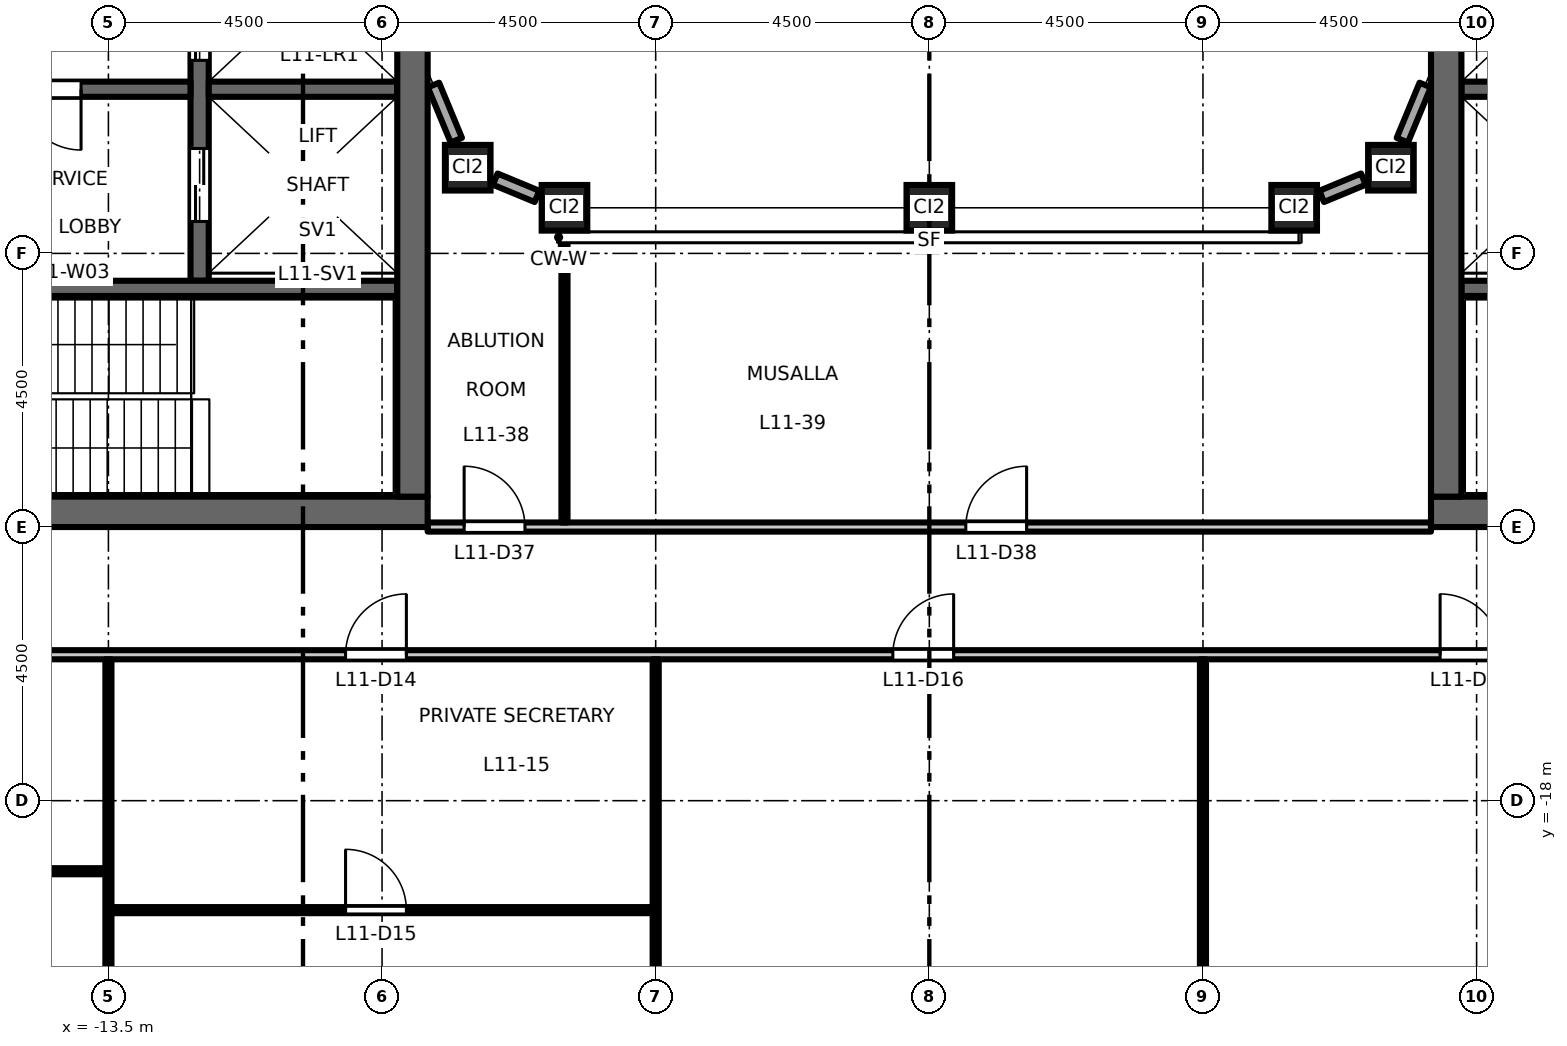
"""IFC4 building model, lengths in metres.
Left out: names, types, materials, properties, quantities, classifications, styles, units other than length and angle.
Written with IfcOpenShell. Run it as: python <this file> out.ifc"""

import sys

from ifc_helpers import new_model, si_unit, direction, frame, frame_2d, origin, origin_2d, place, context, subcontext, project, spatial, rectangle, hollow_rectangle, extrude, element, fill, save


model = new_model("IFC4")
c1 = context("Model", 3, precision=1e-05, world=origin(), true_north=direction((0.0, 1.0)))
c2 = subcontext(c1, "Body", "Model", "MODEL_VIEW")
j1 = project(units=[si_unit("LENGTHUNIT", "METRE"), si_unit("PLANEANGLEUNIT", "RADIAN")], contexts=[c1])
p1 = place(None, origin())
s1 = spatial("IfcSite", under=j1, at=p1, CompositionType="ELEMENT")
p2 = place(p1, origin())
s2 = spatial("IfcBuilding", under=s1, at=p2, CompositionType="ELEMENT")
p3 = place(p2, frame((0.0, 0.0, 53.7)))
s3 = spatial("IfcBuildingStorey", under=s2, at=p3, CompositionType="ELEMENT", Elevation=53.7)
for number, where, z_axis, x_axis in (
    (1, (-7.591, -7.591, 0.0), (0.0, 0.0, 1.0), (1.0, 0.0, 0.0)),
    (2, (-6.0, -8.25, 0.0), (0.0, 0.0, 1.0), (1.0, 0.0, 0.0)),
    (3, (0.0, -8.25, 0.0), (0.0, 0.0, 1.0), (1.0, 0.0, 0.0)),
    (4, (6.0, -8.25, 0.0), (0.0, 0.0, 1.0), (1.0, 0.0, 0.0)),
    (5, (7.591, -7.591, 0.0), (0.0, 0.0, 1.0), (1.0, 0.0, 0.0)),
):
    element("IfcColumn", number, at=place(p3, frame(where, z_axis=z_axis, x_axis=x_axis)), inside=s3, PredefinedType="COLUMN", context=c2, shape_type="SweptSolid", body=[
        extrude(hollow_rectangle(XDim=0.75, YDim=0.75, WallThickness=0.045, at=origin_2d()), origin(), (0.0, 0.0, 1.0), 4.5),
    ])
p4 = place(p3, frame((-12.0, -9.45, 0.0), z_axis=(0.0, 0.0, 1.0), x_axis=(0.0, 1.0, 0.0)))
e6 = element("IfcWall", 6, at=p4, inside=s3, PredefinedType="SHEAR", context=c2, shape_type="SweptSolid", body=[
    extrude(rectangle(XDim=18.9, YDim=0.3, at=frame_2d((9.45, 0.0))), origin(), (0.0, 0.0, 1.0), 4.35),
])
p5 = place(p4, frame((3.625, 0.0, 0.0)))
e7 = element("IfcOpeningElement", 7, at=p5, cuts=e6, PredefinedType="OPENING", context=c2, shape_type="SweptSolid", body=[
    extrude(rectangle(XDim=1.1, YDim=2.1, at=frame_2d((0.55, 1.05))), frame((0.0, 0.16, 0.0), z_axis=(0.0, -1.0, 0.0), x_axis=(1.0, 0.0, 0.0)), (0.0, 0.0, 1.0), 0.32),
])
p6 = place(p4, frame((6.775, 0.0, 0.0)))
e8 = element("IfcOpeningElement", 8, at=p6, cuts=e6, PredefinedType="OPENING", context=c2, shape_type="SweptSolid", body=[
    extrude(rectangle(XDim=1.1, YDim=2.1, at=frame_2d((0.55, 1.05))), frame((0.0, 0.16, 0.0), z_axis=(0.0, -1.0, 0.0), x_axis=(1.0, 0.0, 0.0)), (0.0, 0.0, 1.0), 0.32),
])
p7 = place(p4, frame((9.925, 0.0, 0.0)))
e9 = element("IfcOpeningElement", 9, at=p7, cuts=e6, PredefinedType="OPENING", context=c2, shape_type="SweptSolid", body=[
    extrude(rectangle(XDim=1.1, YDim=2.1, at=frame_2d((0.55, 1.05))), frame((0.0, 0.16, 0.0), z_axis=(0.0, -1.0, 0.0), x_axis=(1.0, 0.0, 0.0)), (0.0, 0.0, 1.0), 0.32),
])
p8 = place(p4, frame((13.075, 0.0, 0.0)))
e10 = element("IfcOpeningElement", 10, at=p8, cuts=e6, PredefinedType="OPENING", context=c2, shape_type="SweptSolid", body=[
    extrude(rectangle(XDim=1.1, YDim=2.1, at=frame_2d((0.55, 1.05))), frame((0.0, 0.16, 0.0), z_axis=(0.0, -1.0, 0.0), x_axis=(1.0, 0.0, 0.0)), (0.0, 0.0, 1.0), 0.32),
])
p9 = place(p4, frame((16.725, 0.0, 0.0)))
e11 = element("IfcOpeningElement", 11, at=p9, cuts=e6, PredefinedType="OPENING", context=c2, shape_type="SweptSolid", body=[
    extrude(rectangle(XDim=1.2, YDim=2.1, at=frame_2d((0.6, 1.05))), frame((0.0, 0.16, 0.0), z_axis=(0.0, -1.0, 0.0), x_axis=(1.0, 0.0, 0.0)), (0.0, 0.0, 1.0), 0.32),
])
p10 = place(p4, frame((0.975, 0.0, 0.0)))
e12 = element("IfcOpeningElement", 12, at=p10, cuts=e6, PredefinedType="OPENING", context=c2, shape_type="SweptSolid", body=[
    extrude(rectangle(XDim=1.2, YDim=2.1, at=frame_2d((0.6, 1.05))), frame((0.0, 0.16, 0.0), z_axis=(0.0, -1.0, 0.0), x_axis=(1.0, 0.0, 0.0)), (0.0, 0.0, 1.0), 0.32),
])
p11 = place(p3, frame((-12.15, -6.3, 0.0), z_axis=(0.0, 0.0, 1.0), x_axis=(-1.0, 0.0, 0.0)))
e13 = element("IfcWall", 13, at=p11, inside=s3, PredefinedType="SHEAR", context=c2, shape_type="SweptSolid", body=[
    extrude(rectangle(XDim=9.1, YDim=0.25, at=frame_2d((4.55, 0.0))), origin(), (0.0, 0.0, 1.0), 4.35),
])
p12 = place(p11, frame((1.8, 0.0, 0.0)))
e14 = element("IfcOpeningElement", 14, at=p12, cuts=e13, PredefinedType="OPENING", context=c2, shape_type="SweptSolid", body=[
    extrude(rectangle(XDim=1.0, YDim=2.1, at=frame_2d((0.5, 1.05))), frame((0.0, 0.135, 0.0), z_axis=(0.0, -1.0, 0.0), x_axis=(1.0, 0.0, 0.0)), (0.0, 0.0, 1.0), 0.27),
])
p13 = place(p11, frame((6.65, 0.0, 0.0)))
e15 = element("IfcOpeningElement", 15, at=p13, cuts=e13, PredefinedType="OPENING", context=c2, shape_type="SweptSolid", body=[
    extrude(rectangle(XDim=0.9, YDim=2.1, at=frame_2d((0.45, 1.05))), frame((0.0, 0.135, 0.0), z_axis=(0.0, -1.0, 0.0), x_axis=(1.0, 0.0, 0.0)), (0.0, 0.0, 1.0), 0.27),
])
p14 = place(p3, frame((-8.75, -6.3, 0.0), z_axis=(0.0, 0.0, 1.0), x_axis=(-1.0, 0.0, 0.0)))
e16 = element("IfcWall", 16, at=p14, inside=s3, PredefinedType="SHEAR", context=c2, shape_type="SweptSolid", body=[
    extrude(rectangle(XDim=3.1, YDim=0.25, at=frame_2d((1.55, 0.0))), origin(), (0.0, 0.0, 1.0), 4.35),
])
p15 = place(p3, frame((-8.75, -9.575, 0.0), z_axis=(0.0, 0.0, 1.0), x_axis=(-1.0, 0.0, 0.0)))
e17 = element("IfcWall", 17, at=p15, inside=s3, PredefinedType="SHEAR", context=c2, shape_type="SweptSolid", body=[
    extrude(rectangle(XDim=8.0, YDim=0.25, at=frame_2d((4.0, 0.0))), origin(), (0.0, 0.0, 1.0), 4.35),
])
p16 = place(p15, frame((6.65, 0.0, 0.0)))
e18 = element("IfcOpeningElement", 18, at=p16, cuts=e17, PredefinedType="OPENING", context=c2, shape_type="SweptSolid", body=[
    extrude(rectangle(XDim=1.1, YDim=2.1, at=frame_2d((0.55, 1.05))), frame((0.0, 0.135, 0.0), z_axis=(0.0, -1.0, 0.0), x_axis=(1.0, 0.0, 0.0)), (0.0, 0.0, 1.0), 0.27),
])
p17 = place(p3, frame((-8.25, -13.25, 0.0), z_axis=(0.0, 0.0, 1.0), x_axis=(-1.0, 0.0, 0.0)))
e19 = element("IfcWall", 19, at=p17, inside=s3, PredefinedType="SHEAR", context=c2, shape_type="SweptSolid", body=[
    extrude(rectangle(XDim=13.5, YDim=0.5, at=frame_2d((6.75, 0.0))), origin(), (0.0, 0.0, 1.0), 4.35),
])
p18 = place(p3, frame((-8.5, -13.0, 0.0), z_axis=(0.0, 0.0, 1.0), x_axis=(0.0, 1.0, 0.0)))
e20 = element("IfcWall", 20, at=p18, inside=s3, PredefinedType="SHEAR", context=c2, shape_type="SweptSolid", body=[
    extrude(rectangle(XDim=26.0, YDim=0.5, at=frame_2d((13.0, 0.0))), origin(), (0.0, 0.0, 1.0), 4.35),
])
p19 = place(p3, frame((8.75, -6.3, 0.0), z_axis=(0.0, 0.0, 1.0), x_axis=(1.0, 0.0, 0.0)))
e21 = element("IfcWall", 21, at=p19, inside=s3, PredefinedType="SHEAR", context=c2, shape_type="SweptSolid", body=[
    extrude(rectangle(XDim=3.1, YDim=0.25, at=frame_2d((1.55, 0.0))), origin(), (0.0, 0.0, 1.0), 4.35),
])
p20 = place(p3, frame((8.75, -9.575, 0.0), z_axis=(0.0, 0.0, 1.0), x_axis=(1.0, 0.0, 0.0)))
e22 = element("IfcWall", 22, at=p20, inside=s3, PredefinedType="SHEAR", context=c2, shape_type="SweptSolid", body=[
    extrude(rectangle(XDim=8.0, YDim=0.25, at=frame_2d((4.0, 0.0))), origin(), (0.0, 0.0, 1.0), 4.35),
])
p21 = place(p20, frame((6.65, 0.0, 0.0)))
e23 = element("IfcOpeningElement", 23, at=p21, cuts=e22, PredefinedType="OPENING", context=c2, shape_type="SweptSolid", body=[
    extrude(rectangle(XDim=1.1, YDim=2.1, at=frame_2d((0.55, 1.05))), frame((0.0, 0.135, 0.0), z_axis=(0.0, -1.0, 0.0), x_axis=(1.0, 0.0, 0.0)), (0.0, 0.0, 1.0), 0.27),
])
p22 = place(p3, frame((8.25, -13.25, 0.0), z_axis=(0.0, 0.0, 1.0), x_axis=(1.0, 0.0, 0.0)))
e24 = element("IfcWall", 24, at=p22, inside=s3, PredefinedType="SHEAR", context=c2, shape_type="SweptSolid", body=[
    extrude(rectangle(XDim=13.5, YDim=0.5, at=frame_2d((6.75, 0.0))), origin(), (0.0, 0.0, 1.0), 4.35),
])
p23 = place(p3, frame((8.5, -13.0, 0.0), z_axis=(0.0, 0.0, 1.0), x_axis=(0.0, 1.0, 0.0)))
e25 = element("IfcWall", 25, at=p23, inside=s3, PredefinedType="SHEAR", context=c2, shape_type="SweptSolid", body=[
    extrude(rectangle(XDim=26.0, YDim=0.5, at=frame_2d((13.0, 0.0))), origin(), (0.0, 0.0, 1.0), 4.35),
])
p24 = place(p3, frame((6.453, -8.062, 0.0), z_axis=(0.0, 0.0, 1.0), x_axis=(0.923940677943, 0.382535780864, 0.0)))
e26 = element("IfcWall", 26, at=p24, inside=s3, PredefinedType="STANDARD", context=c2, shape_type="SweptSolid", body=[
    extrude(rectangle(XDim=0.742, YDim=0.2, at=frame_2d((0.371, 0.0))), origin(), (0.0, 0.0, 1.0), 3.73),
])
for number, where, z_axis, x_axis in (
    (27, (7.779, -7.138, 0.0), (0.0, 0.0, 1.0), (0.383, 0.924, 0.0)),
    (28, (-8.154, -6.231, 0.0), (0.0, 0.0, 1.0), (0.383, -0.924, 0.0)),
):
    element("IfcWall", number, at=place(p3, frame(where, z_axis=z_axis, x_axis=x_axis)), inside=s3, PredefinedType="STANDARD", context=c2, shape_type="SweptSolid", body=[
        extrude(rectangle(XDim=0.982, YDim=0.2, at=frame_2d((0.491, 0.0))), origin(), (0.0, 0.0, 1.0), 3.73),
    ])
p25 = place(p3, frame((-7.138, -7.779, 0.0), z_axis=(0.0, 0.0, 1.0), x_axis=(0.923940677943, -0.382535780864, 0.0)))
e29 = element("IfcWall", 29, at=p25, inside=s3, PredefinedType="STANDARD", context=c2, shape_type="SweptSolid", body=[
    extrude(rectangle(XDim=0.742, YDim=0.2, at=frame_2d((0.371, 0.0))), origin(), (0.0, 0.0, 1.0), 3.73),
])
p26 = place(p3, frame((-13.45, -19.8, 0.0), z_axis=(0.0, 0.0, 1.0), x_axis=(1.0, 0.0, 0.0)))
e30 = element("IfcWall", 30, at=p26, inside=s3, PredefinedType="PARTITIONING", context=c2, shape_type="SweptSolid", body=[
    extrude(rectangle(XDim=8.9, YDim=0.1, at=frame_2d((4.45, 0.0))), origin(), (0.0, 0.0, 1.0), 4.35),
])
p27 = place(p26, frame((3.85, 0.0, 0.0)))
e31 = element("IfcOpeningElement", 31, at=p27, cuts=e30, PredefinedType="OPENING", context=c2, shape_type="SweptSolid", body=[
    extrude(rectangle(XDim=1.0, YDim=2.1, at=frame_2d((0.5, 1.05))), frame((0.0, 0.06, 0.0), z_axis=(0.0, -1.0, 0.0), x_axis=(1.0, 0.0, 0.0)), (0.0, 0.0, 1.0), 0.12),
])
p28 = place(p3, frame((-22.45, -19.16, 0.0), z_axis=(0.0, 0.0, 1.0), x_axis=(1.0, 0.0, 0.0)))
e32 = element("IfcWall", 32, at=p28, inside=s3, PredefinedType="PARTITIONING", context=c2, shape_type="SweptSolid", body=[
    extrude(rectangle(XDim=8.9, YDim=0.1, at=frame_2d((4.45, 0.0))), origin(), (0.0, 0.0, 1.0), 4.35),
])
p29 = place(p28, frame((3.85, 0.0, 0.0)))
e33 = element("IfcOpeningElement", 33, at=p29, cuts=e32, PredefinedType="OPENING", context=c2, shape_type="SweptSolid", body=[
    extrude(rectangle(XDim=1.0, YDim=2.1, at=frame_2d((0.5, 1.05))), frame((0.0, 0.06, 0.0), z_axis=(0.0, -1.0, 0.0), x_axis=(1.0, 0.0, 0.0)), (0.0, 0.0, 1.0), 0.12),
])
p30 = place(p3, frame((-23.925, -15.6, 0.0), z_axis=(0.0, 0.0, 1.0), x_axis=(1.0, 0.0, 0.0)))
e34 = element("IfcWall", 34, at=p30, inside=s3, PredefinedType="PARTITIONING", context=c2, shape_type="SweptSolid", body=[
    extrude(rectangle(XDim=47.85, YDim=0.15, at=frame_2d((23.925, 0.0))), origin(), (0.0, 0.0, 1.0), 4.35),
])
p31 = place(p30, frame((5.325, 0.0, 0.0)))
e35 = element("IfcOpeningElement", 35, at=p31, cuts=e34, PredefinedType="OPENING", context=c2, shape_type="SweptSolid", body=[
    extrude(rectangle(XDim=1.0, YDim=2.1, at=frame_2d((0.5, 1.05))), frame((0.0, 0.085, 0.0), z_axis=(0.0, -1.0, 0.0), x_axis=(1.0, 0.0, 0.0)), (0.0, 0.0, 1.0), 0.17),
])
p32 = place(p30, frame((14.325, 0.0, 0.0)))
e36 = element("IfcOpeningElement", 36, at=p32, cuts=e34, PredefinedType="OPENING", context=c2, shape_type="SweptSolid", body=[
    extrude(rectangle(XDim=1.0, YDim=2.1, at=frame_2d((0.5, 1.05))), frame((0.0, 0.085, 0.0), z_axis=(0.0, -1.0, 0.0), x_axis=(1.0, 0.0, 0.0)), (0.0, 0.0, 1.0), 0.17),
])
p33 = place(p30, frame((23.325, 0.0, 0.0)))
e37 = element("IfcOpeningElement", 37, at=p33, cuts=e34, PredefinedType="OPENING", context=c2, shape_type="SweptSolid", body=[
    extrude(rectangle(XDim=1.0, YDim=2.1, at=frame_2d((0.5, 1.05))), frame((0.0, 0.085, 0.0), z_axis=(0.0, -1.0, 0.0), x_axis=(1.0, 0.0, 0.0)), (0.0, 0.0, 1.0), 0.17),
])
p34 = place(p30, frame((32.325, 0.0, 0.0)))
e38 = element("IfcOpeningElement", 38, at=p34, cuts=e34, PredefinedType="OPENING", context=c2, shape_type="SweptSolid", body=[
    extrude(rectangle(XDim=1.0, YDim=2.1, at=frame_2d((0.5, 1.05))), frame((0.0, 0.085, 0.0), z_axis=(0.0, -1.0, 0.0), x_axis=(1.0, 0.0, 0.0)), (0.0, 0.0, 1.0), 0.17),
])
p35 = place(p30, frame((41.325, 0.0, 0.0)))
e39 = element("IfcOpeningElement", 39, at=p35, cuts=e34, PredefinedType="OPENING", context=c2, shape_type="SweptSolid", body=[
    extrude(rectangle(XDim=1.0, YDim=2.1, at=frame_2d((0.5, 1.05))), frame((0.0, 0.085, 0.0), z_axis=(0.0, -1.0, 0.0), x_axis=(1.0, 0.0, 0.0)), (0.0, 0.0, 1.0), 0.17),
])
p36 = place(p3, frame((-8.25, -13.5, 0.0), z_axis=(0.0, 0.0, 1.0), x_axis=(1.0, 0.0, 0.0)))
e40 = element("IfcWall", 40, at=p36, inside=s3, PredefinedType="PARTITIONING", context=c2, shape_type="SweptSolid", body=[
    extrude(rectangle(XDim=16.5, YDim=0.15, at=frame_2d((8.25, 0.0))), origin(), (0.0, 0.0, 1.0), 3.85),
])
p37 = place(p36, frame((0.6, 0.0, 0.0)))
e41 = element("IfcOpeningElement", 41, at=p37, cuts=e40, PredefinedType="OPENING", context=c2, shape_type="SweptSolid", body=[
    extrude(rectangle(XDim=1.0, YDim=2.1, at=frame_2d((0.5, 1.05))), frame((0.0, 0.085, 0.0), z_axis=(0.0, -1.0, 0.0), x_axis=(1.0, 0.0, 0.0)), (0.0, 0.0, 1.0), 0.17),
])
p38 = place(p36, frame((8.85, 0.0, 0.0)))
e42 = element("IfcOpeningElement", 42, at=p38, cuts=e40, PredefinedType="OPENING", context=c2, shape_type="SweptSolid", body=[
    extrude(rectangle(XDim=1.0, YDim=2.1, at=frame_2d((0.5, 1.05))), frame((0.0, 0.085, 0.0), z_axis=(0.0, -1.0, 0.0), x_axis=(1.0, 0.0, 0.0)), (0.0, 0.0, 1.0), 0.17),
])
p39 = place(p3, frame((-13.5, -30.51, 0.0), z_axis=(0.0, 0.0, 1.0), x_axis=(0.0, 1.0, 0.0)))
e43 = element("IfcWall", 43, at=p39, inside=s3, PredefinedType="PARTITIONING", context=c2, shape_type="SweptSolid", body=[
    extrude(rectangle(XDim=14.835, YDim=0.1, at=frame_2d((7.417, 0.0))), origin(), (0.0, 0.0, 1.0), 3.35),
])
p40 = place(p3, frame((-6.0, -13.425, 0.0), z_axis=(0.0, 0.0, 1.0), x_axis=(0.0, 1.0, 0.0)))
e44 = element("IfcWall", 44, at=p40, inside=s3, PredefinedType="PARTITIONING", context=c2, shape_type="SweptSolid", body=[
    extrude(rectangle(XDim=4.725, YDim=0.1, at=frame_2d((2.363, 0.0))), origin(), (0.0, 0.0, 1.0), 4.35),
])
for number, where, z_axis, x_axis in (
    (45, (-4.5, -30.51, 0.0), (0.0, 0.0, 1.0), (0.0, 1.0, 0.0)),
    (46, (4.5, -30.51, 0.0), (0.0, 0.0, 1.0), (0.0, 1.0, 0.0)),
):
    element("IfcWall", number, at=place(p3, frame(where, z_axis=z_axis, x_axis=x_axis)), inside=s3, PredefinedType="PARTITIONING", context=c2, shape_type="SweptSolid", body=[
        extrude(rectangle(XDim=14.835, YDim=0.1, at=frame_2d((7.417, 0.0))), origin(), (0.0, 0.0, 1.0), 3.35),
    ])
p41 = place(p12, origin())
e47 = element("IfcDoor", 47, at=p41, inside=s3, OperationType="SINGLE_SWING_RIGHT", PredefinedType="DOOR", context=c2, shape_type="SweptSolid", body=[
    extrude(rectangle(XDim=1.0, YDim=2.1, at=frame_2d((0.5, 1.05))), frame((0.0, 0.025, 0.0), z_axis=(0.0, -1.0, 0.0), x_axis=(1.0, 0.0, 0.0)), (0.0, 0.0, 1.0), 0.05),
])
fill(e14, e47)
p42 = place(p5, origin())
e48 = element("IfcDoor", 48, at=p42, inside=s3, OperationType="DOUBLE_DOOR_SLIDING", PredefinedType="DOOR", context=c2, shape_type="SweptSolid", body=[
    extrude(rectangle(XDim=1.1, YDim=2.1, at=frame_2d((0.55, 1.05))), frame((0.0, 0.025, 0.0), z_axis=(0.0, -1.0, 0.0), x_axis=(1.0, 0.0, 0.0)), (0.0, 0.0, 1.0), 0.05),
])
fill(e7, e48)
p43 = place(p10, origin())
e49 = element("IfcDoor", 49, at=p43, inside=s3, OperationType="DOUBLE_DOOR_SLIDING", PredefinedType="DOOR", context=c2, shape_type="SweptSolid", body=[
    extrude(rectangle(XDim=1.2, YDim=2.1, at=frame_2d((0.6, 1.05))), frame((0.0, 0.025, 0.0), z_axis=(0.0, -1.0, 0.0), x_axis=(1.0, 0.0, 0.0)), (0.0, 0.0, 1.0), 0.05),
])
fill(e12, e49)
p44 = place(p32, origin())
e50 = element("IfcDoor", 50, at=p44, inside=s3, OperationType="SINGLE_SWING_RIGHT", PredefinedType="DOOR", context=c2, shape_type="SweptSolid", body=[
    extrude(rectangle(XDim=1.0, YDim=2.1, at=frame_2d((0.5, 1.05))), frame((0.0, 0.025, 0.0), z_axis=(0.0, -1.0, 0.0), x_axis=(1.0, 0.0, 0.0)), (0.0, 0.0, 1.0), 0.05),
])
fill(e36, e50)
p45 = place(p27, origin())
e51 = element("IfcDoor", 51, at=p45, inside=s3, OperationType="SINGLE_SWING_LEFT", PredefinedType="DOOR", context=c2, shape_type="SweptSolid", body=[
    extrude(rectangle(XDim=1.0, YDim=2.1, at=frame_2d((0.5, 1.05))), frame((0.0, 0.025, 0.0), z_axis=(0.0, -1.0, 0.0), x_axis=(1.0, 0.0, 0.0)), (0.0, 0.0, 1.0), 0.05),
])
fill(e31, e51)
p46 = place(p33, origin())
e52 = element("IfcDoor", 52, at=p46, inside=s3, OperationType="SINGLE_SWING_RIGHT", PredefinedType="DOOR", context=c2, shape_type="SweptSolid", body=[
    extrude(rectangle(XDim=1.0, YDim=2.1, at=frame_2d((0.5, 1.05))), frame((0.0, 0.025, 0.0), z_axis=(0.0, -1.0, 0.0), x_axis=(1.0, 0.0, 0.0)), (0.0, 0.0, 1.0), 0.05),
])
fill(e37, e52)
p47 = place(p34, origin())
e53 = element("IfcDoor", 53, at=p47, inside=s3, OperationType="SINGLE_SWING_LEFT", PredefinedType="DOOR", context=c2, shape_type="SweptSolid", body=[
    extrude(rectangle(XDim=1.0, YDim=2.1, at=frame_2d((0.5, 1.05))), frame((0.0, 0.025, 0.0), z_axis=(0.0, -1.0, 0.0), x_axis=(1.0, 0.0, 0.0)), (0.0, 0.0, 1.0), 0.05),
])
fill(e38, e53)
p48 = place(p37, origin())
e54 = element("IfcDoor", 54, at=p48, inside=s3, OperationType="SINGLE_SWING_LEFT", PredefinedType="DOOR", context=c2, shape_type="SweptSolid", body=[
    extrude(rectangle(XDim=1.0, YDim=2.1, at=frame_2d((0.5, 1.05))), frame((0.0, 0.025, 0.0), z_axis=(0.0, -1.0, 0.0), x_axis=(1.0, 0.0, 0.0)), (0.0, 0.0, 1.0), 0.05),
])
fill(e41, e54)
p49 = place(p38, origin())
e55 = element("IfcDoor", 55, at=p49, inside=s3, OperationType="SINGLE_SWING_RIGHT", PredefinedType="DOOR", context=c2, shape_type="SweptSolid", body=[
    extrude(rectangle(XDim=1.0, YDim=2.1, at=frame_2d((0.5, 1.05))), frame((0.0, 0.025, 0.0), z_axis=(0.0, -1.0, 0.0), x_axis=(1.0, 0.0, 0.0)), (0.0, 0.0, 1.0), 0.05),
])
fill(e42, e55)
save(model, sys.argv[1])
